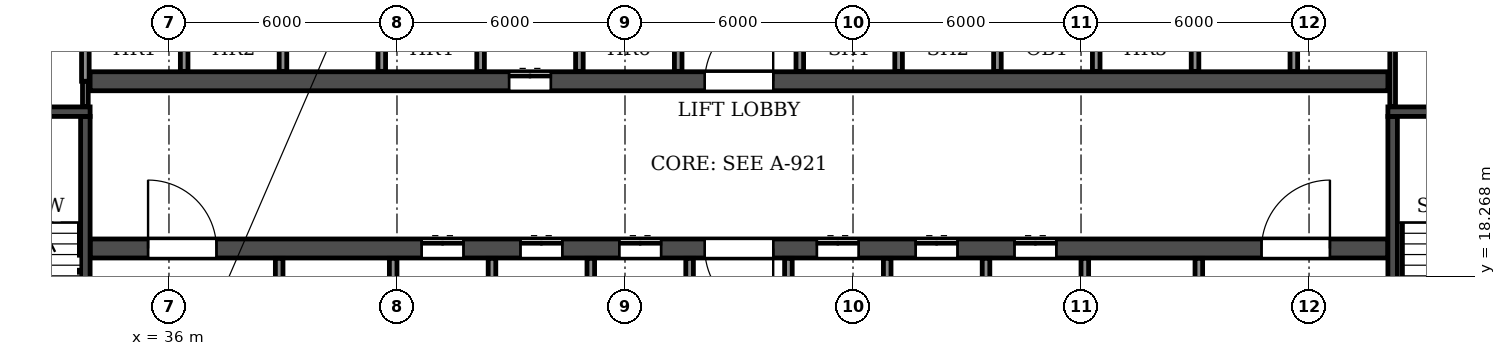
"""IFC4 building model, lengths in metres.
Left out: names, types, materials, properties, quantities, classifications, styles, units other than length and angle.
Written with IfcOpenShell. Run it as: python <this file> out.ifc"""

import sys

from ifc_helpers import new_model, si_unit, direction, frame, frame_2d, origin, place, context, subcontext, project, spatial, rectangle, extrude, element, fill, save


model = new_model("IFC4")
c1 = context("Model", 3, precision=1e-05, world=origin(), true_north=direction((0.0, 1.0)))
c2 = subcontext(c1, "Body", "Model", "MODEL_VIEW")
j1 = project(units=[si_unit("LENGTHUNIT", "METRE"), si_unit("PLANEANGLEUNIT", "RADIAN")], contexts=[c1])
p1 = place(None, origin())
s1 = spatial("IfcSite", under=j1, at=p1, CompositionType="ELEMENT")
p2 = place(p1, origin())
s2 = spatial("IfcBuilding", under=s1, at=p2, CompositionType="ELEMENT")
p3 = place(p2, frame((0.0, 0.0, 112.5)))
s3 = spatial("IfcBuildingStorey", under=s2, at=p3, CompositionType="ELEMENT", Elevation=112.5)
p4 = place(p3, frame((33.925, 19.0, 0.0), z_axis=(0.0, 0.0, 1.0), x_axis=(1.0, 0.0, 0.0)))
e1 = element("IfcWall", 1, at=p4, inside=s3, PredefinedType="SOLIDWALL", context=c2, shape_type="SweptSolid", body=[
    extrude(rectangle(XDim=34.15, YDim=0.5, at=frame_2d((17.075, 0.0))), origin(), (0.0, 0.0, 1.0), 2.95),
])
p5 = place(p4, frame((16.175, 0.0, 0.0)))
e2 = element("IfcOpeningElement", 2, at=p5, cuts=e1, PredefinedType="OPENING", context=c2, shape_type="SweptSolid", body=[
    extrude(rectangle(XDim=1.8, YDim=2.1, at=frame_2d((0.9, 1.05))), frame((0.0, 0.26, 0.0), z_axis=(0.0, -1.0, 0.0), x_axis=(1.0, 0.0, 0.0)), (0.0, 0.0, 1.0), 0.52),
])
p6 = place(p4, frame((1.525, 0.0, 0.0)))
e3 = element("IfcOpeningElement", 3, at=p6, cuts=e1, PredefinedType="OPENING", context=c2, shape_type="SweptSolid", body=[
    extrude(rectangle(XDim=1.8, YDim=2.1, at=frame_2d((0.9, 1.05))), frame((0.0, 0.26, 0.0), z_axis=(0.0, -1.0, 0.0), x_axis=(1.0, 0.0, 0.0)), (0.0, 0.0, 1.0), 0.52),
])
p7 = place(p4, frame((8.725, 0.0, 0.0)))
e4 = element("IfcOpeningElement", 4, at=p7, cuts=e1, PredefinedType="OPENING", context=c2, shape_type="SweptSolid", body=[
    extrude(rectangle(XDim=1.1, YDim=2.1, at=frame_2d((0.55, 1.05))), frame((0.0, 0.26, 0.0), z_axis=(0.0, -1.0, 0.0), x_axis=(1.0, 0.0, 0.0)), (0.0, 0.0, 1.0), 0.52),
])
p8 = place(p4, frame((11.325, 0.0, 0.0)))
e5 = element("IfcOpeningElement", 5, at=p8, cuts=e1, PredefinedType="OPENING", context=c2, shape_type="SweptSolid", body=[
    extrude(rectangle(XDim=1.1, YDim=2.1, at=frame_2d((0.55, 1.05))), frame((0.0, 0.26, 0.0), z_axis=(0.0, -1.0, 0.0), x_axis=(1.0, 0.0, 0.0)), (0.0, 0.0, 1.0), 0.52),
])
p9 = place(p4, frame((13.925, 0.0, 0.0)))
e6 = element("IfcOpeningElement", 6, at=p9, cuts=e1, PredefinedType="OPENING", context=c2, shape_type="SweptSolid", body=[
    extrude(rectangle(XDim=1.1, YDim=2.1, at=frame_2d((0.55, 1.05))), frame((0.0, 0.26, 0.0), z_axis=(0.0, -1.0, 0.0), x_axis=(1.0, 0.0, 0.0)), (0.0, 0.0, 1.0), 0.52),
])
p10 = place(p4, frame((19.125, 0.0, 0.0)))
e7 = element("IfcOpeningElement", 7, at=p10, cuts=e1, PredefinedType="OPENING", context=c2, shape_type="SweptSolid", body=[
    extrude(rectangle(XDim=1.1, YDim=2.1, at=frame_2d((0.55, 1.05))), frame((0.0, 0.26, 0.0), z_axis=(0.0, -1.0, 0.0), x_axis=(1.0, 0.0, 0.0)), (0.0, 0.0, 1.0), 0.52),
])
p11 = place(p4, frame((21.725, 0.0, 0.0)))
e8 = element("IfcOpeningElement", 8, at=p11, cuts=e1, PredefinedType="OPENING", context=c2, shape_type="SweptSolid", body=[
    extrude(rectangle(XDim=1.1, YDim=2.1, at=frame_2d((0.55, 1.05))), frame((0.0, 0.26, 0.0), z_axis=(0.0, -1.0, 0.0), x_axis=(1.0, 0.0, 0.0)), (0.0, 0.0, 1.0), 0.52),
])
p12 = place(p4, frame((24.325, 0.0, 0.0)))
e9 = element("IfcOpeningElement", 9, at=p12, cuts=e1, PredefinedType="OPENING", context=c2, shape_type="SweptSolid", body=[
    extrude(rectangle(XDim=1.1, YDim=2.1, at=frame_2d((0.55, 1.05))), frame((0.0, 0.26, 0.0), z_axis=(0.0, -1.0, 0.0), x_axis=(1.0, 0.0, 0.0)), (0.0, 0.0, 1.0), 0.52),
])
p13 = place(p4, frame((30.825, 0.0, 0.0)))
e10 = element("IfcOpeningElement", 10, at=p13, cuts=e1, PredefinedType="OPENING", context=c2, shape_type="SweptSolid", body=[
    extrude(rectangle(XDim=1.8, YDim=2.1, at=frame_2d((0.9, 1.05))), frame((0.0, 0.26, 0.0), z_axis=(0.0, -1.0, 0.0), x_axis=(1.0, 0.0, 0.0)), (0.0, 0.0, 1.0), 0.52),
])
p14 = place(p3, frame((33.925, 23.4, 0.0), z_axis=(0.0, 0.0, 1.0), x_axis=(1.0, 0.0, 0.0)))
e11 = element("IfcWall", 11, at=p14, inside=s3, PredefinedType="SOLIDWALL", context=c2, shape_type="SweptSolid", body=[
    extrude(rectangle(XDim=34.15, YDim=0.5, at=frame_2d((17.075, 0.0))), origin(), (0.0, 0.0, 1.0), 2.95),
])
p15 = place(p14, frame((16.175, 0.0, 0.0)))
e12 = element("IfcOpeningElement", 12, at=p15, cuts=e11, PredefinedType="OPENING", context=c2, shape_type="SweptSolid", body=[
    extrude(rectangle(XDim=1.8, YDim=2.1, at=frame_2d((0.9, 1.05))), frame((0.0, 0.26, 0.0), z_axis=(0.0, -1.0, 0.0), x_axis=(1.0, 0.0, 0.0)), (0.0, 0.0, 1.0), 0.52),
])
p16 = place(p14, frame((11.025, 0.0, 0.0)))
e13 = element("IfcOpeningElement", 13, at=p16, cuts=e11, PredefinedType="OPENING", context=c2, shape_type="SweptSolid", body=[
    extrude(rectangle(XDim=1.1, YDim=2.1, at=frame_2d((0.55, 1.05))), frame((0.0, 0.26, 0.0), z_axis=(0.0, -1.0, 0.0), x_axis=(1.0, 0.0, 0.0)), (0.0, 0.0, 1.0), 0.52),
])
p17 = place(p3, frame((33.8, 14.85, 0.0), z_axis=(0.0, 0.0, 1.0), x_axis=(0.0, 1.0, 0.0)))
e14 = element("IfcWall", 14, at=p17, inside=s3, PredefinedType="SOLIDWALL", context=c2, shape_type="SweptSolid", body=[
    extrude(rectangle(XDim=7.625, YDim=0.25, at=frame_2d((3.812, 0.0))), origin(), (0.0, 0.0, 1.0), 2.95),
])
p18 = place(p17, frame((0.45, 0.0, 0.0)))
e15 = element("IfcOpeningElement", 15, at=p18, cuts=e14, PredefinedType="OPENING", context=c2, shape_type="SweptSolid", body=[
    extrude(rectangle(XDim=1.0, YDim=2.1, at=frame_2d((0.5, 1.05))), frame((0.0, 0.135, 0.0), z_axis=(0.0, -1.0, 0.0), x_axis=(1.0, 0.0, 0.0)), (0.0, 0.0, 1.0), 0.27),
])
p19 = place(p3, frame((29.875, 22.6, 0.0), z_axis=(0.0, 0.0, 1.0), x_axis=(1.0, 0.0, 0.0)))
e16 = element("IfcWall", 16, at=p19, inside=s3, PredefinedType="SOLIDWALL", context=c2, shape_type="SweptSolid", body=[
    extrude(rectangle(XDim=4.05, YDim=0.25, at=frame_2d((2.025, 0.0))), origin(), (0.0, 0.0, 1.0), 2.95),
])
p20 = place(p3, frame((68.2, 14.85, 0.0), z_axis=(0.0, 0.0, 1.0), x_axis=(0.0, 1.0, 0.0)))
e17 = element("IfcWall", 17, at=p20, inside=s3, PredefinedType="SOLIDWALL", context=c2, shape_type="SweptSolid", body=[
    extrude(rectangle(XDim=7.625, YDim=0.25, at=frame_2d((3.812, 0.0))), origin(), (0.0, 0.0, 1.0), 2.95),
])
p21 = place(p20, frame((0.45, 0.0, 0.0)))
e18 = element("IfcOpeningElement", 18, at=p21, cuts=e17, PredefinedType="OPENING", context=c2, shape_type="SweptSolid", body=[
    extrude(rectangle(XDim=1.0, YDim=2.1, at=frame_2d((0.5, 1.05))), frame((0.0, 0.135, 0.0), z_axis=(0.0, -1.0, 0.0), x_axis=(1.0, 0.0, 0.0)), (0.0, 0.0, 1.0), 0.27),
])
p22 = place(p3, frame((68.075, 22.6, 0.0), z_axis=(0.0, 0.0, 1.0), x_axis=(1.0, 0.0, 0.0)))
e19 = element("IfcWall", 19, at=p22, inside=s3, PredefinedType="SOLIDWALL", context=c2, shape_type="SweptSolid", body=[
    extrude(rectangle(XDim=4.05, YDim=0.25, at=frame_2d((2.025, 0.0))), origin(), (0.0, 0.0, 1.0), 2.95),
])
p23 = place(p3, frame((65.6, 23.66, 0.0), z_axis=(0.0, 0.0, 1.0), x_axis=(0.0, 1.0, 0.0)))
e20 = element("IfcWall", 20, at=p23, inside=s3, PredefinedType="PARTITIONING", context=c2, shape_type="SweptSolid", body=[
    extrude(rectangle(XDim=3.88, YDim=0.2, at=frame_2d((1.94, 0.0))), origin(), (0.0, 0.0, 1.0), 2.95),
])
p24 = place(p3, frame((33.8, 22.735, 0.0), z_axis=(0.0, 0.0, 1.0), x_axis=(0.0, 1.0, 0.0)))
e21 = element("IfcWall", 21, at=p24, inside=s3, PredefinedType="PARTITIONING", context=c2, shape_type="SweptSolid", body=[
    extrude(rectangle(XDim=0.665, YDim=0.15, at=frame_2d((0.333, 0.0))), origin(), (0.0, 0.0, 1.0), 2.95),
])
p25 = place(p3, frame((68.2, 22.735, 0.0), z_axis=(0.0, 0.0, 1.0), x_axis=(0.0, 1.0, 0.0)))
e22 = element("IfcWall", 22, at=p25, inside=s3, PredefinedType="PARTITIONING", context=c2, shape_type="SweptSolid", body=[
    extrude(rectangle(XDim=4.805, YDim=0.15, at=frame_2d((2.402, 0.0))), origin(), (0.0, 0.0, 1.0), 2.95),
])
p26 = place(p3, frame((33.8, 23.4, 0.0), z_axis=(0.0, 0.0, 1.0), x_axis=(0.0, 1.0, 0.0)))
e23 = element("IfcWall", 23, at=p26, inside=s3, PredefinedType="PARTITIONING", context=c2, shape_type="SweptSolid", body=[
    extrude(rectangle(XDim=2.7, YDim=0.2, at=frame_2d((1.35, 0.0))), origin(), (0.0, 0.0, 1.0), 2.95),
])
p27 = place(p3, frame((36.4, 23.66, 0.0), z_axis=(0.0, 0.0, 1.0), x_axis=(0.0, 1.0, 0.0)))
e24 = element("IfcWall", 24, at=p27, inside=s3, PredefinedType="PARTITIONING", context=c2, shape_type="SweptSolid", body=[
    extrude(rectangle(XDim=2.44, YDim=0.2, at=frame_2d((1.22, 0.0))), origin(), (0.0, 0.0, 1.0), 2.95),
])
p28 = place(p3, frame((38.9, 14.86, 0.0), z_axis=(0.0, 0.0, 1.0), x_axis=(0.0, 1.0, 0.0)))
e25 = element("IfcWall", 25, at=p28, inside=s3, PredefinedType="PARTITIONING", context=c2, shape_type="SweptSolid", body=[
    extrude(rectangle(XDim=3.88, YDim=0.2, at=frame_2d((1.94, 0.0))), origin(), (0.0, 0.0, 1.0), 2.95),
])
p29 = place(p28, frame((1.39, 0.0, 0.0)))
e26 = element("IfcOpeningElement", 26, at=p29, cuts=e25, PredefinedType="OPENING", context=c2, shape_type="SweptSolid", body=[
    extrude(rectangle(XDim=1.1, YDim=2.1, at=frame_2d((0.55, 1.05))), frame((0.0, 0.11, 0.0), z_axis=(0.0, -1.0, 0.0), x_axis=(1.0, 0.0, 0.0)), (0.0, 0.0, 1.0), 0.22),
])
for number, where, z_axis, x_axis in (
    (27, (39.0, 23.66, 0.0), (0.0, 0.0, 1.0), (0.0, 1.0, 0.0)),
    (28, (41.6, 23.66, 0.0), (0.0, 0.0, 1.0), (0.0, 1.0, 0.0)),
):
    element("IfcWall", number, at=place(p3, frame(where, z_axis=z_axis, x_axis=x_axis)), inside=s3, PredefinedType="PARTITIONING", context=c2, shape_type="SweptSolid", body=[
        extrude(rectangle(XDim=2.44, YDim=0.2, at=frame_2d((1.22, 0.0))), origin(), (0.0, 0.0, 1.0), 2.95),
    ])
p30 = place(p3, frame((41.9, 14.86, 0.0), z_axis=(0.0, 0.0, 1.0), x_axis=(0.0, 1.0, 0.0)))
e29 = element("IfcWall", 29, at=p30, inside=s3, PredefinedType="PARTITIONING", context=c2, shape_type="SweptSolid", body=[
    extrude(rectangle(XDim=3.88, YDim=0.2, at=frame_2d((1.94, 0.0))), origin(), (0.0, 0.0, 1.0), 2.95),
])
p31 = place(p3, frame((44.2, 23.66, 0.0), z_axis=(0.0, 0.0, 1.0), x_axis=(0.0, 1.0, 0.0)))
e30 = element("IfcWall", 30, at=p31, inside=s3, PredefinedType="PARTITIONING", context=c2, shape_type="SweptSolid", body=[
    extrude(rectangle(XDim=3.88, YDim=0.2, at=frame_2d((1.94, 0.0))), origin(), (0.0, 0.0, 1.0), 2.95),
])
p32 = place(p3, frame((44.5, 16.3, 0.0), z_axis=(0.0, 0.0, 1.0), x_axis=(0.0, 1.0, 0.0)))
e31 = element("IfcWall", 31, at=p32, inside=s3, PredefinedType="PARTITIONING", context=c2, shape_type="SweptSolid", body=[
    extrude(rectangle(XDim=2.44, YDim=0.2, at=frame_2d((1.22, 0.0))), origin(), (0.0, 0.0, 1.0), 2.95),
])
p33 = place(p3, frame((46.8, 23.66, 0.0), z_axis=(0.0, 0.0, 1.0), x_axis=(0.0, 1.0, 0.0)))
e32 = element("IfcWall", 32, at=p33, inside=s3, PredefinedType="PARTITIONING", context=c2, shape_type="SweptSolid", body=[
    extrude(rectangle(XDim=3.88, YDim=0.2, at=frame_2d((1.94, 0.0))), origin(), (0.0, 0.0, 1.0), 2.95),
])
p34 = place(p3, frame((47.1, 16.3, 0.0), z_axis=(0.0, 0.0, 1.0), x_axis=(0.0, 1.0, 0.0)))
e33 = element("IfcWall", 33, at=p34, inside=s3, PredefinedType="PARTITIONING", context=c2, shape_type="SweptSolid", body=[
    extrude(rectangle(XDim=2.44, YDim=0.2, at=frame_2d((1.22, 0.0))), origin(), (0.0, 0.0, 1.0), 2.95),
])
p35 = place(p3, frame((49.4, 23.66, 0.0), z_axis=(0.0, 0.0, 1.0), x_axis=(0.0, 1.0, 0.0)))
e34 = element("IfcWall", 34, at=p35, inside=s3, PredefinedType="PARTITIONING", context=c2, shape_type="SweptSolid", body=[
    extrude(rectangle(XDim=2.44, YDim=0.2, at=frame_2d((1.22, 0.0))), origin(), (0.0, 0.0, 1.0), 2.95),
])
for number, where, z_axis, x_axis in (
    (35, (49.7, 16.3, 0.0), (0.0, 0.0, 1.0), (0.0, 1.0, 0.0)),
    (36, (52.3, 16.3, 0.0), (0.0, 0.0, 1.0), (0.0, 1.0, 0.0)),
):
    element("IfcWall", number, at=place(p3, frame(where, z_axis=z_axis, x_axis=x_axis)), inside=s3, PredefinedType="PARTITIONING", context=c2, shape_type="SweptSolid", body=[
        extrude(rectangle(XDim=2.44, YDim=0.2, at=frame_2d((1.22, 0.0))), origin(), (0.0, 0.0, 1.0), 2.95),
    ])
p36 = place(p3, frame((52.6, 23.66, 0.0), z_axis=(0.0, 0.0, 1.0), x_axis=(0.0, 1.0, 0.0)))
e37 = element("IfcWall", 37, at=p36, inside=s3, PredefinedType="PARTITIONING", context=c2, shape_type="SweptSolid", body=[
    extrude(rectangle(XDim=2.44, YDim=0.2, at=frame_2d((1.22, 0.0))), origin(), (0.0, 0.0, 1.0), 2.95),
])
p37 = place(p3, frame((54.9, 16.3, 0.0), z_axis=(0.0, 0.0, 1.0), x_axis=(0.0, 1.0, 0.0)))
e38 = element("IfcWall", 38, at=p37, inside=s3, PredefinedType="PARTITIONING", context=c2, shape_type="SweptSolid", body=[
    extrude(rectangle(XDim=2.44, YDim=0.2, at=frame_2d((1.22, 0.0))), origin(), (0.0, 0.0, 1.0), 2.95),
])
p38 = place(p3, frame((55.2, 23.66, 0.0), z_axis=(0.0, 0.0, 1.0), x_axis=(0.0, 1.0, 0.0)))
e39 = element("IfcWall", 39, at=p38, inside=s3, PredefinedType="PARTITIONING", context=c2, shape_type="SweptSolid", body=[
    extrude(rectangle(XDim=2.44, YDim=0.2, at=frame_2d((1.22, 0.0))), origin(), (0.0, 0.0, 1.0), 2.95),
])
p39 = place(p3, frame((57.5, 16.3, 0.0), z_axis=(0.0, 0.0, 1.0), x_axis=(0.0, 1.0, 0.0)))
e40 = element("IfcWall", 40, at=p39, inside=s3, PredefinedType="PARTITIONING", context=c2, shape_type="SweptSolid", body=[
    extrude(rectangle(XDim=2.44, YDim=0.2, at=frame_2d((1.22, 0.0))), origin(), (0.0, 0.0, 1.0), 2.95),
])
p40 = place(p3, frame((57.8, 23.66, 0.0), z_axis=(0.0, 0.0, 1.0), x_axis=(0.0, 1.0, 0.0)))
e41 = element("IfcWall", 41, at=p40, inside=s3, PredefinedType="PARTITIONING", context=c2, shape_type="SweptSolid", body=[
    extrude(rectangle(XDim=2.44, YDim=0.2, at=frame_2d((1.22, 0.0))), origin(), (0.0, 0.0, 1.0), 2.95),
])
p41 = place(p3, frame((60.1, 14.86, 0.0), z_axis=(0.0, 0.0, 1.0), x_axis=(0.0, 1.0, 0.0)))
e42 = element("IfcWall", 42, at=p41, inside=s3, PredefinedType="PARTITIONING", context=c2, shape_type="SweptSolid", body=[
    extrude(rectangle(XDim=3.88, YDim=0.2, at=frame_2d((1.94, 0.0))), origin(), (0.0, 0.0, 1.0), 2.95),
])
for number, where, z_axis, x_axis in (
    (43, (60.4, 23.66, 0.0), (0.0, 0.0, 1.0), (0.0, 1.0, 0.0)),
    (44, (63.0, 23.66, 0.0), (0.0, 0.0, 1.0), (0.0, 1.0, 0.0)),
):
    element("IfcWall", number, at=place(p3, frame(where, z_axis=z_axis, x_axis=x_axis)), inside=s3, PredefinedType="PARTITIONING", context=c2, shape_type="SweptSolid", body=[
        extrude(rectangle(XDim=2.44, YDim=0.2, at=frame_2d((1.22, 0.0))), origin(), (0.0, 0.0, 1.0), 2.95),
    ])
p42 = place(p3, frame((63.1, 14.86, 0.0), z_axis=(0.0, 0.0, 1.0), x_axis=(0.0, 1.0, 0.0)))
e45 = element("IfcWall", 45, at=p42, inside=s3, PredefinedType="PARTITIONING", context=c2, shape_type="SweptSolid", body=[
    extrude(rectangle(XDim=3.88, YDim=0.2, at=frame_2d((1.94, 0.0))), origin(), (0.0, 0.0, 1.0), 2.95),
])
p43 = place(p42, frame((1.39, 0.0, 0.0)))
e46 = element("IfcOpeningElement", 46, at=p43, cuts=e45, PredefinedType="OPENING", context=c2, shape_type="SweptSolid", body=[
    extrude(rectangle(XDim=1.1, YDim=2.1, at=frame_2d((0.55, 1.05))), frame((0.0, 0.11, 0.0), z_axis=(0.0, -1.0, 0.0), x_axis=(1.0, 0.0, 0.0)), (0.0, 0.0, 1.0), 0.22),
])
p44 = place(p15, origin())
e47 = element("IfcDoor", 47, at=p44, inside=s3, OperationType="DOUBLE_DOOR_SINGLE_SWING", PredefinedType="DOOR", context=c2, shape_type="SweptSolid", body=[
    extrude(rectangle(XDim=1.8, YDim=2.1, at=frame_2d((0.9, 1.05))), frame((0.0, 0.025, 0.0), z_axis=(0.0, -1.0, 0.0), x_axis=(1.0, 0.0, 0.0)), (0.0, 0.0, 1.0), 0.05),
])
fill(e12, e47)
p45 = place(p5, frame((1.8, 0.0, 0.0), z_axis=(0.0, 0.0, 1.0), x_axis=(-1.0, 0.0, 0.0)))
e48 = element("IfcDoor", 48, at=p45, inside=s3, OperationType="DOUBLE_DOOR_SINGLE_SWING", PredefinedType="DOOR", context=c2, shape_type="SweptSolid", body=[
    extrude(rectangle(XDim=1.8, YDim=2.1, at=frame_2d((0.9, 1.05))), frame((0.0, 0.025, 0.0), z_axis=(0.0, -1.0, 0.0), x_axis=(1.0, 0.0, 0.0)), (0.0, 0.0, 1.0), 0.05),
])
fill(e2, e48)
p46 = place(p6, origin())
e49 = element("IfcDoor", 49, at=p46, inside=s3, OperationType="DOUBLE_DOOR_SINGLE_SWING", PredefinedType="DOOR", context=c2, shape_type="SweptSolid", body=[
    extrude(rectangle(XDim=1.8, YDim=2.1, at=frame_2d((0.9, 1.05))), frame((0.0, 0.025, 0.0), z_axis=(0.0, -1.0, 0.0), x_axis=(1.0, 0.0, 0.0)), (0.0, 0.0, 1.0), 0.05),
])
fill(e3, e49)
p47 = place(p7, origin())
e50 = element("IfcDoor", 50, at=p47, inside=s3, OperationType="DOUBLE_DOOR_SLIDING", PredefinedType="DOOR", context=c2, shape_type="SweptSolid", body=[
    extrude(rectangle(XDim=1.1, YDim=2.1, at=frame_2d((0.55, 1.05))), frame((0.0, 0.025, 0.0), z_axis=(0.0, -1.0, 0.0), x_axis=(1.0, 0.0, 0.0)), (0.0, 0.0, 1.0), 0.05),
])
fill(e4, e50)
p48 = place(p16, origin())
e51 = element("IfcDoor", 51, at=p48, inside=s3, OperationType="DOUBLE_DOOR_SLIDING", PredefinedType="DOOR", context=c2, shape_type="SweptSolid", body=[
    extrude(rectangle(XDim=1.1, YDim=2.1, at=frame_2d((0.55, 1.05))), frame((0.0, 0.025, 0.0), z_axis=(0.0, -1.0, 0.0), x_axis=(1.0, 0.0, 0.0)), (0.0, 0.0, 1.0), 0.05),
])
fill(e13, e51)
p49 = place(p8, origin())
e52 = element("IfcDoor", 52, at=p49, inside=s3, OperationType="DOUBLE_DOOR_SLIDING", PredefinedType="DOOR", context=c2, shape_type="SweptSolid", body=[
    extrude(rectangle(XDim=1.1, YDim=2.1, at=frame_2d((0.55, 1.05))), frame((0.0, 0.025, 0.0), z_axis=(0.0, -1.0, 0.0), x_axis=(1.0, 0.0, 0.0)), (0.0, 0.0, 1.0), 0.05),
])
fill(e5, e52)
p50 = place(p9, origin())
e53 = element("IfcDoor", 53, at=p50, inside=s3, OperationType="DOUBLE_DOOR_SLIDING", PredefinedType="DOOR", context=c2, shape_type="SweptSolid", body=[
    extrude(rectangle(XDim=1.1, YDim=2.1, at=frame_2d((0.55, 1.05))), frame((0.0, 0.025, 0.0), z_axis=(0.0, -1.0, 0.0), x_axis=(1.0, 0.0, 0.0)), (0.0, 0.0, 1.0), 0.05),
])
fill(e6, e53)
p51 = place(p10, origin())
e54 = element("IfcDoor", 54, at=p51, inside=s3, OperationType="DOUBLE_DOOR_SLIDING", PredefinedType="DOOR", context=c2, shape_type="SweptSolid", body=[
    extrude(rectangle(XDim=1.1, YDim=2.1, at=frame_2d((0.55, 1.05))), frame((0.0, 0.025, 0.0), z_axis=(0.0, -1.0, 0.0), x_axis=(1.0, 0.0, 0.0)), (0.0, 0.0, 1.0), 0.05),
])
fill(e7, e54)
p52 = place(p11, origin())
e55 = element("IfcDoor", 55, at=p52, inside=s3, OperationType="DOUBLE_DOOR_SLIDING", PredefinedType="DOOR", context=c2, shape_type="SweptSolid", body=[
    extrude(rectangle(XDim=1.1, YDim=2.1, at=frame_2d((0.55, 1.05))), frame((0.0, 0.025, 0.0), z_axis=(0.0, -1.0, 0.0), x_axis=(1.0, 0.0, 0.0)), (0.0, 0.0, 1.0), 0.05),
])
fill(e8, e55)
p53 = place(p12, origin())
e56 = element("IfcDoor", 56, at=p53, inside=s3, OperationType="DOUBLE_DOOR_SLIDING", PredefinedType="DOOR", context=c2, shape_type="SweptSolid", body=[
    extrude(rectangle(XDim=1.1, YDim=2.1, at=frame_2d((0.55, 1.05))), frame((0.0, 0.025, 0.0), z_axis=(0.0, -1.0, 0.0), x_axis=(1.0, 0.0, 0.0)), (0.0, 0.0, 1.0), 0.05),
])
fill(e9, e56)
p54 = place(p13, origin())
e57 = element("IfcDoor", 57, at=p54, inside=s3, OperationType="DOUBLE_DOOR_SINGLE_SWING", PredefinedType="DOOR", context=c2, shape_type="SweptSolid", body=[
    extrude(rectangle(XDim=1.8, YDim=2.1, at=frame_2d((0.9, 1.05))), frame((0.0, 0.025, 0.0), z_axis=(0.0, -1.0, 0.0), x_axis=(1.0, 0.0, 0.0)), (0.0, 0.0, 1.0), 0.05),
])
fill(e10, e57)
save(model, sys.argv[1])
